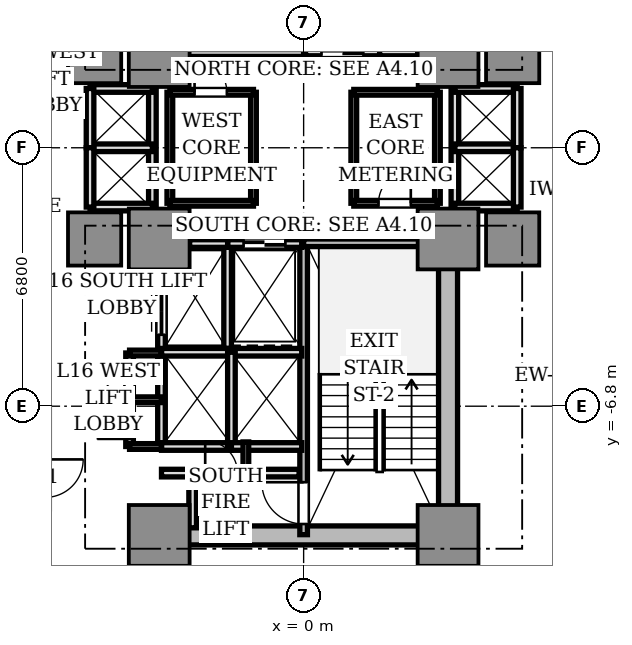
"""IFC4 building model, lengths in metres.
Left out: names, types, materials, properties, quantities, classifications, styles, units other than length and angle.
Written with IfcOpenShell. Run it as: python <this file> out.ifc"""

import sys

from ifc_helpers import new_model, si_unit, direction, frame, frame_2d, origin, origin_2d, place, context, subcontext, project, spatial, rectangle, extrude, source, transform, mapped, element, fill, save


model = new_model("IFC4")
c1 = context("Model", 3, precision=1e-05, world=origin(), true_north=direction((0.0, 1.0)))
c2 = subcontext(c1, "Body", "Model", "MODEL_VIEW")
j1 = project(units=[si_unit("LENGTHUNIT", "METRE"), si_unit("PLANEANGLEUNIT", "RADIAN")], contexts=[c1])
p1 = place(None, origin())
s1 = spatial("IfcSite", under=j1, at=p1, CompositionType="ELEMENT")
p2 = place(p1, origin())
s2 = spatial("IfcBuilding", under=s1, at=p2, CompositionType="ELEMENT")
p3 = place(p2, frame((0.0, 0.0, 61.1)))
s3 = spatial("IfcBuildingStorey", under=s2, at=p3, CompositionType="ELEMENT", Elevation=61.1)
p4 = place(p3, frame((-3.55, -10.2, 0.0), z_axis=(0.0, 0.0, 1.0), x_axis=(1.0, 0.0, 0.0)))
e1 = element("IfcWall", 1, at=p4, inside=s3, PredefinedType="SHEAR", context=c2, shape_type="SweptSolid", body=[
    extrude(rectangle(XDim=7.1, YDim=0.5, at=frame_2d((3.55, 0.0))), origin(), (0.0, 0.0, 1.0), 3.11),
])
p5 = place(p3, frame((3.8, -9.75, 0.0), z_axis=(0.0, 0.0, 1.0), x_axis=(0.0, 1.0, 0.0)))
e2 = element("IfcWall", 2, at=p5, inside=s3, PredefinedType="SHEAR", context=c2, shape_type="SweptSolid", body=[
    extrude(rectangle(XDim=6.9, YDim=0.5, at=frame_2d((3.45, 0.0))), origin(), (0.0, 0.0, 1.0), 3.11),
])
m1 = source(origin(), c2, "Body", "SweptSolid", [
    extrude(rectangle(XDim=1.6, YDim=1.6, at=origin_2d()), origin(), (0.0, 0.0, 1.0), 3.11),
])
for number, where, z_axis, x_axis in (
    (3, (-3.8, 2.4, 0.0), (0.0, 0.0, 1.0), (1.0, 0.0, 0.0)),
    (4, (3.8, 2.4, 0.0), (0.0, 0.0, 1.0), (1.0, 0.0, 0.0)),
    (5, (-3.8, -2.4, 0.0), (0.0, 0.0, 1.0), (1.0, 0.0, 0.0)),
    (6, (3.8, -2.4, 0.0), (0.0, 0.0, 1.0), (1.0, 0.0, 0.0)),
    (7, (-3.8, -10.2, 0.0), (0.0, 0.0, 1.0), (1.0, 0.0, 0.0)),
    (8, (3.8, -10.2, 0.0), (0.0, 0.0, 1.0), (1.0, 0.0, 0.0)),
):
    element("IfcColumn", number, at=place(p3, frame(where, z_axis=z_axis, x_axis=x_axis)), inside=s3, PredefinedType="COLUMN", context=c2, shape_type="MappedRepresentation", body=[
        mapped(m1, transform((0.0, 0.0, 0.0), scale=1.0)),
    ])
m2 = source(origin(), c2, "Body", "SweptSolid", [
    extrude(rectangle(XDim=1.4, YDim=1.4, at=origin_2d()), origin(), (0.0, 0.0, 1.0), 3.11),
])
for number, where, z_axis, x_axis in (
    (9, (5.5, 2.4, 0.0), (0.0, 0.0, 1.0), (1.0, 0.0, 0.0)),
    (10, (-5.5, 2.4, 0.0), (0.0, 0.0, 1.0), (1.0, 0.0, 0.0)),
    (11, (5.5, -2.4, 0.0), (0.0, 0.0, 1.0), (1.0, 0.0, 0.0)),
    (12, (-5.5, -2.4, 0.0), (0.0, 0.0, 1.0), (1.0, 0.0, 0.0)),
):
    element("IfcColumn", number, at=place(p3, frame(where, z_axis=z_axis, x_axis=x_axis)), inside=s3, PredefinedType="COLUMN", context=c2, shape_type="MappedRepresentation", body=[
        mapped(m2, transform((0.0, 0.0, 0.0), scale=1.0)),
    ])
p6 = place(p3, frame((0.0, 2.5, 0.0), z_axis=(0.0, 0.0, 1.0), x_axis=(0.0, 1.0, 0.0)))
e13 = element("IfcWall", 13, at=p6, inside=s3, PredefinedType="SOLIDWALL", context=c2, shape_type="SweptSolid", body=[
    extrude(rectangle(XDim=7.68, YDim=0.2, at=frame_2d((3.84, 0.0))), origin(), (0.0, 0.0, 1.0), 3.11),
])
p7 = place(p6, frame((6.5, 0.0, 0.0)))
e14 = element("IfcOpeningElement", 14, at=p7, cuts=e13, PredefinedType="OPENING", context=c2, shape_type="SweptSolid", body=[
    extrude(rectangle(XDim=0.95, YDim=2.15, at=frame_2d((0.475, 1.075))), frame((0.0, 0.11, 0.0), z_axis=(0.0, -1.0, 0.0), x_axis=(1.0, 0.0, 0.0)), (0.0, 0.0, 1.0), 0.22),
])
p8 = place(p3, frame((-3.72, 2.5, 0.0), z_axis=(0.0, 0.0, 1.0), x_axis=(1.0, 0.0, 0.0)))
e15 = element("IfcWall", 15, at=p8, inside=s3, PredefinedType="SOLIDWALL", context=c2, shape_type="SweptSolid", body=[
    extrude(rectangle(XDim=3.72, YDim=0.2, at=frame_2d((1.86, 0.0))), origin(), (0.0, 0.0, 1.0), 3.11),
])
p9 = place(p3, frame((0.0, -10.18, 0.0), z_axis=(0.0, 0.0, 1.0), x_axis=(0.0, 1.0, 0.0)))
e16 = element("IfcWall", 16, at=p9, inside=s3, PredefinedType="SOLIDWALL", context=c2, shape_type="SweptSolid", body=[
    extrude(rectangle(XDim=7.68, YDim=0.2, at=frame_2d((3.84, 0.0))), origin(), (0.0, 0.0, 1.0), 3.11),
])
p10 = place(p9, frame((0.28, 0.0, 0.0)))
e17 = element("IfcOpeningElement", 17, at=p10, cuts=e16, PredefinedType="OPENING", context=c2, shape_type="SweptSolid", body=[
    extrude(rectangle(XDim=1.1, YDim=2.15, at=frame_2d((0.55, 1.075))), frame((0.0, 0.11, 0.0), z_axis=(0.0, -1.0, 0.0), x_axis=(1.0, 0.0, 0.0)), (0.0, 0.0, 1.0), 0.22),
])
p11 = place(p3, frame((0.0, -2.5, 0.0), z_axis=(0.0, 0.0, 1.0), x_axis=(1.0, 0.0, 0.0)))
e18 = element("IfcWall", 18, at=p11, inside=s3, PredefinedType="SOLIDWALL", context=c2, shape_type="SweptSolid", body=[
    extrude(rectangle(XDim=3.72, YDim=0.2, at=frame_2d((1.86, 0.0))), origin(), (0.0, 0.0, 1.0), 3.11),
])
p12 = place(p3, frame((2.0, 2.5, 0.0), z_axis=(0.0, 0.0, 1.0), x_axis=(0.0, 1.0, 0.0)))
e19 = element("IfcWall", 19, at=p12, inside=s3, PredefinedType="SOLIDWALL", context=c2, shape_type="SweptSolid", body=[
    extrude(rectangle(XDim=2.78, YDim=0.2, at=frame_2d((1.39, 0.0))), origin(), (0.0, 0.0, 1.0), 2.66),
])
p13 = place(p3, frame((0.05, 2.52, 0.0), z_axis=(0.0, 0.0, 1.0), x_axis=(1.0, 0.0, 0.0)))
e20 = element("IfcWall", 20, at=p13, inside=s3, PredefinedType="SOLIDWALL", context=c2, shape_type="SweptSolid", body=[
    extrude(rectangle(XDim=1.95, YDim=0.2, at=frame_2d((0.975, 0.0))), origin(), (0.0, 0.0, 1.0), 2.66),
])
p14 = place(p13, frame((0.42, 0.0, 0.0)))
e21 = element("IfcOpeningElement", 21, at=p14, cuts=e20, PredefinedType="OPENING", context=c2, shape_type="SweptSolid", body=[
    extrude(rectangle(XDim=1.1, YDim=2.2, at=frame_2d((0.55, 1.1))), frame((0.0, 0.11, 0.0), z_axis=(0.0, -1.0, 0.0), x_axis=(1.0, 0.0, 0.0)), (0.0, 0.0, 1.0), 0.22),
])
p15 = place(p3, frame((-2.0, -5.28, 0.0), z_axis=(0.0, 0.0, 1.0), x_axis=(0.0, 1.0, 0.0)))
e22 = element("IfcWall", 22, at=p15, inside=s3, PredefinedType="SOLIDWALL", context=c2, shape_type="SweptSolid", body=[
    extrude(rectangle(XDim=2.78, YDim=0.2, at=frame_2d((1.39, 0.0))), origin(), (0.0, 0.0, 1.0), 2.66),
])
p16 = place(p3, frame((-2.0, -2.52, 0.0), z_axis=(0.0, 0.0, 1.0), x_axis=(1.0, 0.0, 0.0)))
e23 = element("IfcWall", 23, at=p16, inside=s3, PredefinedType="SOLIDWALL", context=c2, shape_type="SweptSolid", body=[
    extrude(rectangle(XDim=1.95, YDim=0.2, at=frame_2d((0.975, 0.0))), origin(), (0.0, 0.0, 1.0), 2.66),
])
p17 = place(p16, frame((0.42, 0.0, 0.0)))
e24 = element("IfcOpeningElement", 24, at=p17, cuts=e23, PredefinedType="OPENING", context=c2, shape_type="SweptSolid", body=[
    extrude(rectangle(XDim=1.1, YDim=2.2, at=frame_2d((0.55, 1.1))), frame((0.0, 0.11, 0.0), z_axis=(0.0, -1.0, 0.0), x_axis=(1.0, 0.0, 0.0)), (0.0, 0.0, 1.0), 0.22),
])
for number, where, z_axis, x_axis in (
    (25, (2.0, 2.52, 0.0), (0.0, 0.0, 1.0), (1.0, 0.0, 0.0)),
    (26, (-3.0, -2.52, 0.0), (0.0, 0.0, 1.0), (1.0, 0.0, 0.0)),
):
    element("IfcWall", number, at=place(p3, frame(where, z_axis=z_axis, x_axis=x_axis)), inside=s3, PredefinedType="SOLIDWALL", context=c2, shape_type="SweptSolid", body=[
        extrude(rectangle(XDim=1.0, YDim=0.2, at=frame_2d((0.5, 0.0))), origin(), (0.0, 0.0, 1.0), 2.66),
    ])
p18 = place(p3, frame((-3.74, -5.36, 0.0), z_axis=(0.0, 0.0, 1.0), x_axis=(0.0, 1.0, 0.0)))
e27 = element("IfcWall", 27, at=p18, inside=s3, PredefinedType="SOLIDWALL", context=c2, shape_type="SweptSolid", body=[
    extrude(rectangle(XDim=2.08, YDim=0.2, at=frame_2d((1.04, 0.0))), origin(), (0.0, 0.0, 1.0), 2.66),
])
p19 = place(p18, frame((0.44, 0.0, 0.0)))
e28 = element("IfcOpeningElement", 28, at=p19, cuts=e27, PredefinedType="OPENING", context=c2, shape_type="SweptSolid", body=[
    extrude(rectangle(XDim=1.2, YDim=2.2, at=frame_2d((0.6, 1.1))), frame((0.0, 0.11, 0.0), z_axis=(0.0, -1.0, 0.0), x_axis=(1.0, 0.0, 0.0)), (0.0, 0.0, 1.0), 0.22),
])
p20 = place(p3, frame((-3.74, -7.86, 0.0), z_axis=(0.0, 0.0, 1.0), x_axis=(0.0, 1.0, 0.0)))
e29 = element("IfcWall", 29, at=p20, inside=s3, PredefinedType="SOLIDWALL", context=c2, shape_type="SweptSolid", body=[
    extrude(rectangle(XDim=2.48, YDim=0.2, at=frame_2d((1.24, 0.0))), origin(), (0.0, 0.0, 1.0), 2.66),
])
p21 = place(p3, frame((-3.74, -7.86, 0.0), z_axis=(0.0, 0.0, 1.0), x_axis=(1.0, 0.0, 0.0)))
e30 = element("IfcWall", 30, at=p21, inside=s3, PredefinedType="SOLIDWALL", context=c2, shape_type="SweptSolid", body=[
    extrude(rectangle(XDim=1.84, YDim=0.2, at=frame_2d((0.92, 0.0))), origin(), (0.0, 0.0, 1.0), 2.66),
])
p22 = place(p3, frame((-3.74, -5.38, 0.0), z_axis=(0.0, 0.0, 1.0), x_axis=(1.0, 0.0, 0.0)))
e31 = element("IfcWall", 31, at=p22, inside=s3, PredefinedType="SOLIDWALL", context=c2, shape_type="SweptSolid", body=[
    extrude(rectangle(XDim=3.69, YDim=0.2, at=frame_2d((1.845, 0.0))), origin(), (0.0, 0.0, 1.0), 2.66),
])
p23 = place(p3, frame((-1.9, -7.86, 0.0), z_axis=(0.0, 0.0, 1.0), x_axis=(0.0, 1.0, 0.0)))
e32 = element("IfcWall", 32, at=p23, inside=s3, PredefinedType="SOLIDWALL", context=c2, shape_type="SweptSolid", body=[
    extrude(rectangle(XDim=2.48, YDim=0.2, at=frame_2d((1.24, 0.0))), origin(), (0.0, 0.0, 1.0), 2.66),
])
p24 = place(p3, frame((-1.9, -7.86, 0.0), z_axis=(0.0, 0.0, 1.0), x_axis=(1.0, 0.0, 0.0)))
e33 = element("IfcWall", 33, at=p24, inside=s3, PredefinedType="SOLIDWALL", context=c2, shape_type="SweptSolid", body=[
    extrude(rectangle(XDim=1.85, YDim=0.2, at=frame_2d((0.925, 0.0))), origin(), (0.0, 0.0, 1.0), 2.66),
])
p25 = place(p3, frame((3.98, -1.56, 0.0), z_axis=(0.0, 0.0, 1.0), x_axis=(0.0, 1.0, 0.0)))
e34 = element("IfcWall", 34, at=p25, inside=s3, PredefinedType="SOLIDWALL", context=c2, shape_type="SweptSolid", body=[
    extrude(rectangle(XDim=3.12, YDim=0.2, at=frame_2d((1.56, 0.0))), origin(), (0.0, 0.0, 1.0), 2.18),
])
for number, where, z_axis, x_axis in (
    (35, (3.98, 1.56, 0.0), (0.0, 0.0, 1.0), (1.0, 0.0, 0.0)),
    (36, (3.98, -1.56, 0.0), (0.0, 0.0, 1.0), (1.0, 0.0, 0.0)),
    (37, (3.98, 0.0, 0.0), (0.0, 0.0, 1.0), (1.0, 0.0, 0.0)),
):
    element("IfcWall", number, at=place(p3, frame(where, z_axis=z_axis, x_axis=x_axis)), inside=s3, PredefinedType="SOLIDWALL", context=c2, shape_type="SweptSolid", body=[
        extrude(rectangle(XDim=1.64, YDim=0.2, at=frame_2d((0.82, 0.0))), origin(), (0.0, 0.0, 1.0), 2.66),
    ])
for number, where, z_axis, x_axis in (
    (38, (5.62, 0.0, 0.0), (0.0, 0.0, 1.0), (0.0, 1.0, 0.0)),
    (39, (5.62, -1.56, 0.0), (0.0, 0.0, 1.0), (0.0, 1.0, 0.0)),
):
    element("IfcWall", number, at=place(p3, frame(where, z_axis=z_axis, x_axis=x_axis)), inside=s3, PredefinedType="SOLIDWALL", context=c2, shape_type="SweptSolid", body=[
        extrude(rectangle(XDim=1.56, YDim=0.2, at=frame_2d((0.78, 0.0))), origin(), (0.0, 0.0, 1.0), 2.66),
    ])
p26 = place(p3, frame((-3.98, -1.56, 0.0), z_axis=(0.0, 0.0, 1.0), x_axis=(0.0, 1.0, 0.0)))
e40 = element("IfcWall", 40, at=p26, inside=s3, PredefinedType="SOLIDWALL", context=c2, shape_type="SweptSolid", body=[
    extrude(rectangle(XDim=3.12, YDim=0.2, at=frame_2d((1.56, 0.0))), origin(), (0.0, 0.0, 1.0), 2.18),
])
for number, where, z_axis, x_axis in (
    (41, (-5.62, 1.56, 0.0), (0.0, 0.0, 1.0), (1.0, 0.0, 0.0)),
    (42, (-5.62, -1.56, 0.0), (0.0, 0.0, 1.0), (1.0, 0.0, 0.0)),
    (43, (-5.62, 0.0, 0.0), (0.0, 0.0, 1.0), (1.0, 0.0, 0.0)),
):
    element("IfcWall", number, at=place(p3, frame(where, z_axis=z_axis, x_axis=x_axis)), inside=s3, PredefinedType="SOLIDWALL", context=c2, shape_type="SweptSolid", body=[
        extrude(rectangle(XDim=1.64, YDim=0.2, at=frame_2d((0.82, 0.0))), origin(), (0.0, 0.0, 1.0), 2.66),
    ])
for number, where, z_axis, x_axis in (
    (44, (-5.62, 0.0, 0.0), (0.0, 0.0, 1.0), (0.0, 1.0, 0.0)),
    (45, (-5.62, -1.56, 0.0), (0.0, 0.0, 1.0), (0.0, 1.0, 0.0)),
):
    element("IfcWall", number, at=place(p3, frame(where, z_axis=z_axis, x_axis=x_axis)), inside=s3, PredefinedType="SOLIDWALL", context=c2, shape_type="SweptSolid", body=[
        extrude(rectangle(XDim=1.56, YDim=0.2, at=frame_2d((0.78, 0.0))), origin(), (0.0, 0.0, 1.0), 2.66),
    ])
p27 = place(p3, frame((-3.74, -8.56, 0.0), z_axis=(0.0, 0.0, 1.0), x_axis=(1.0, 0.0, 0.0)))
e46 = element("IfcWall", 46, at=p27, inside=s3, PredefinedType="SOLIDWALL", context=c2, shape_type="SweptSolid", body=[
    extrude(rectangle(XDim=3.62, YDim=0.2, at=frame_2d((1.81, 0.0))), origin(), (0.0, 0.0, 1.0), 2.66),
])
p28 = place(p27, frame((1.15, 0.0, 0.0)))
e47 = element("IfcOpeningElement", 47, at=p28, cuts=e46, PredefinedType="OPENING", context=c2, shape_type="SweptSolid", body=[
    extrude(rectangle(XDim=0.85, YDim=2.1, at=frame_2d((0.425, 1.05))), frame((0.0, 0.11, 0.0), z_axis=(0.0, -1.0, 0.0), x_axis=(1.0, 0.0, 0.0)), (0.0, 0.0, 1.0), 0.22),
])
p29 = place(p3, frame((-2.92, -10.0, 0.0), z_axis=(0.0, 0.0, 1.0), x_axis=(0.0, 1.0, 0.0)))
e48 = element("IfcWall", 48, at=p29, inside=s3, PredefinedType="SOLIDWALL", context=c2, shape_type="SweptSolid", body=[
    extrude(rectangle(XDim=1.44, YDim=0.2, at=frame_2d((0.72, 0.0))), origin(), (0.0, 0.0, 1.0), 2.66),
])
p30 = place(p3, frame((-1.52, -8.56, 0.0), z_axis=(0.0, 0.0, 1.0), x_axis=(0.0, 1.0, 0.0)))
e49 = element("IfcWall", 49, at=p30, inside=s3, PredefinedType="PARTITIONING", context=c2, shape_type="SweptSolid", body=[
    extrude(rectangle(XDim=0.82, YDim=0.15, at=frame_2d((0.41, 0.0))), origin(), (0.0, 0.0, 1.0), 2.66),
])
p31 = place(p3, frame((-4.58, -7.86, 0.0), z_axis=(0.0, 0.0, 1.0), x_axis=(0.0, 1.0, 0.0)))
e50 = element("IfcWall", 50, at=p31, inside=s3, PredefinedType="SOLIDWALL", context=c2, shape_type="SweptSolid", body=[
    extrude(rectangle(XDim=2.46, YDim=0.2, at=frame_2d((1.23, 0.0))), origin(), (0.0, 0.0, 1.0), 2.66),
])
p32 = place(p31, frame((0.2, 0.0, 0.0)))
e51 = element("IfcOpeningElement", 51, at=p32, cuts=e50, PredefinedType="OPENING", context=c2, shape_type="SweptSolid", body=[
    extrude(rectangle(XDim=0.85, YDim=2.1, at=frame_2d((0.425, 1.05))), frame((0.0, 0.11, 0.0), z_axis=(0.0, -1.0, 0.0), x_axis=(1.0, 0.0, 0.0)), (0.0, 0.0, 1.0), 0.22),
])
p33 = place(p31, frame((1.38, 0.0, 0.0)))
e52 = element("IfcOpeningElement", 52, at=p33, cuts=e50, PredefinedType="OPENING", context=c2, shape_type="SweptSolid", body=[
    extrude(rectangle(XDim=0.85, YDim=2.1, at=frame_2d((0.425, 1.05))), frame((0.0, 0.11, 0.0), z_axis=(0.0, -1.0, 0.0), x_axis=(1.0, 0.0, 0.0)), (0.0, 0.0, 1.0), 0.22),
])
for number, where, z_axis, x_axis in (
    (53, (-4.58, -5.4, 0.0), (0.0, 0.0, 1.0), (1.0, 0.0, 0.0)),
    (54, (-4.58, -7.86, 0.0), (0.0, 0.0, 1.0), (1.0, 0.0, 0.0)),
    (55, (-4.58, -6.63, 0.0), (0.0, 0.0, 1.0), (1.0, 0.0, 0.0)),
):
    element("IfcWall", number, at=place(p3, frame(where, z_axis=z_axis, x_axis=x_axis)), inside=s3, PredefinedType="PARTITIONING", context=c2, shape_type="SweptSolid", body=[
        extrude(rectangle(XDim=0.84, YDim=0.15, at=frame_2d((0.42, 0.0))), origin(), (0.0, 0.0, 1.0), 2.66),
    ])
p34 = place(p3, frame((-1.32, -1.46, 0.0), z_axis=(0.0, 0.0, 1.0), x_axis=(0.0, 1.0, 0.0)))
e56 = element("IfcWall", 56, at=p34, inside=s3, PredefinedType="PARTITIONING", context=c2, shape_type="SweptSolid", body=[
    extrude(rectangle(XDim=2.92, YDim=0.15, at=frame_2d((1.46, 0.0))), origin(), (0.0, 0.0, 1.0), 2.66),
])
p35 = place(p3, frame((-3.52, -1.46, 0.0), z_axis=(0.0, 0.0, 1.0), x_axis=(0.0, 1.0, 0.0)))
e57 = element("IfcWall", 57, at=p35, inside=s3, PredefinedType="PARTITIONING", context=c2, shape_type="SweptSolid", body=[
    extrude(rectangle(XDim=2.92, YDim=0.15, at=frame_2d((1.46, 0.0))), origin(), (0.0, 0.0, 1.0), 2.18),
])
p36 = place(p3, frame((-3.52, 1.46, 0.0), z_axis=(0.0, 0.0, 1.0), x_axis=(1.0, 0.0, 0.0)))
e58 = element("IfcWall", 58, at=p36, inside=s3, PredefinedType="PARTITIONING", context=c2, shape_type="SweptSolid", body=[
    extrude(rectangle(XDim=2.2, YDim=0.15, at=frame_2d((1.1, 0.0))), origin(), (0.0, 0.0, 1.0), 2.66),
])
p37 = place(p36, frame((0.65, 0.0, 0.0)))
e59 = element("IfcOpeningElement", 59, at=p37, cuts=e58, PredefinedType="OPENING", context=c2, shape_type="SweptSolid", body=[
    extrude(rectangle(XDim=0.85, YDim=2.1, at=frame_2d((0.425, 1.05))), frame((0.0, 0.085, 0.0), z_axis=(0.0, -1.0, 0.0), x_axis=(1.0, 0.0, 0.0)), (0.0, 0.0, 1.0), 0.17),
])
p38 = place(p3, frame((-3.52, -1.46, 0.0), z_axis=(0.0, 0.0, 1.0), x_axis=(1.0, 0.0, 0.0)))
e60 = element("IfcWall", 60, at=p38, inside=s3, PredefinedType="PARTITIONING", context=c2, shape_type="SweptSolid", body=[
    extrude(rectangle(XDim=2.2, YDim=0.15, at=frame_2d((1.1, 0.0))), origin(), (0.0, 0.0, 1.0), 2.66),
])
p39 = place(p3, frame((1.32, -1.46, 0.0), z_axis=(0.0, 0.0, 1.0), x_axis=(0.0, 1.0, 0.0)))
e61 = element("IfcWall", 61, at=p39, inside=s3, PredefinedType="PARTITIONING", context=c2, shape_type="SweptSolid", body=[
    extrude(rectangle(XDim=2.92, YDim=0.15, at=frame_2d((1.46, 0.0))), origin(), (0.0, 0.0, 1.0), 2.66),
])
p40 = place(p3, frame((3.52, -1.46, 0.0), z_axis=(0.0, 0.0, 1.0), x_axis=(0.0, 1.0, 0.0)))
e62 = element("IfcWall", 62, at=p40, inside=s3, PredefinedType="PARTITIONING", context=c2, shape_type="SweptSolid", body=[
    extrude(rectangle(XDim=2.92, YDim=0.15, at=frame_2d((1.46, 0.0))), origin(), (0.0, 0.0, 1.0), 2.18),
])
p41 = place(p3, frame((1.32, 1.46, 0.0), z_axis=(0.0, 0.0, 1.0), x_axis=(1.0, 0.0, 0.0)))
e63 = element("IfcWall", 63, at=p41, inside=s3, PredefinedType="PARTITIONING", context=c2, shape_type="SweptSolid", body=[
    extrude(rectangle(XDim=2.2, YDim=0.15, at=frame_2d((1.1, 0.0))), origin(), (0.0, 0.0, 1.0), 2.66),
])
p42 = place(p3, frame((1.32, -1.46, 0.0), z_axis=(0.0, 0.0, 1.0), x_axis=(1.0, 0.0, 0.0)))
e64 = element("IfcWall", 64, at=p42, inside=s3, PredefinedType="PARTITIONING", context=c2, shape_type="SweptSolid", body=[
    extrude(rectangle(XDim=2.2, YDim=0.15, at=frame_2d((1.1, 0.0))), origin(), (0.0, 0.0, 1.0), 2.66),
])
p43 = place(p42, frame((0.65, 0.0, 0.0)))
e65 = element("IfcOpeningElement", 65, at=p43, cuts=e64, PredefinedType="OPENING", context=c2, shape_type="SweptSolid", body=[
    extrude(rectangle(XDim=0.85, YDim=2.1, at=frame_2d((0.425, 1.05))), frame((0.0, 0.085, 0.0), z_axis=(0.0, -1.0, 0.0), x_axis=(1.0, 0.0, 0.0)), (0.0, 0.0, 1.0), 0.17),
])
m3 = source(origin(), c2, "Body", "SweptSolid", [
    extrude(rectangle(XDim=1.1, YDim=0.05, at=origin_2d()), origin(), (0.0, 0.0, 1.0), 2.2),
])
p44 = place(p14, frame((0.55, 0.0, 0.0)))
e66 = element("IfcDoor", 66, at=p44, inside=s3, OperationType="DOUBLE_DOOR_SLIDING", PredefinedType="DOOR", context=c2, shape_type="MappedRepresentation", body=[
    mapped(m3, transform((0.0, 0.0, 0.0), scale=1.0)),
])
fill(e21, e66)
p45 = place(p17, frame((0.55, 0.0, 0.0)))
e67 = element("IfcDoor", 67, at=p45, inside=s3, OperationType="DOUBLE_DOOR_SLIDING", PredefinedType="DOOR", context=c2, shape_type="MappedRepresentation", body=[
    mapped(m3, transform((0.0, 0.0, 0.0), scale=1.0)),
])
fill(e24, e67)
m4 = source(origin(), c2, "Body", "SweptSolid", [
    extrude(rectangle(XDim=1.2, YDim=0.05, at=origin_2d()), origin(), (0.0, 0.0, 1.0), 2.2),
])
p46 = place(p19, frame((0.6, 0.0, 0.0)))
e68 = element("IfcDoor", 68, at=p46, inside=s3, OperationType="DOUBLE_DOOR_SLIDING", PredefinedType="DOOR", context=c2, shape_type="MappedRepresentation", body=[
    mapped(m4, transform((0.0, 0.0, 0.0), scale=1.0)),
])
fill(e28, e68)
m5 = source(origin(), c2, "Body", "SweptSolid", [
    extrude(rectangle(XDim=1.1, YDim=0.05, at=origin_2d()), origin(), (0.0, 0.0, 1.0), 2.15),
])
p47 = place(p10, frame((0.55, 0.0, 0.0)))
e69 = element("IfcDoor", 69, at=p47, inside=s3, OperationType="SINGLE_SWING_RIGHT", PredefinedType="DOOR", context=c2, shape_type="MappedRepresentation", body=[
    mapped(m5, transform((0.0, 0.0, 0.0), scale=1.0)),
])
fill(e17, e69)
m6 = source(origin(), c2, "Body", "SweptSolid", [
    extrude(rectangle(XDim=0.85, YDim=0.05, at=origin_2d()), origin(), (0.0, 0.0, 1.0), 2.1),
])
p48 = place(p28, frame((0.425, 0.0, 0.0)))
e70 = element("IfcDoor", 70, at=p48, inside=s3, OperationType="SINGLE_SWING_LEFT", PredefinedType="DOOR", context=c2, shape_type="MappedRepresentation", body=[
    mapped(m6, transform((0.0, 0.0, 0.0), scale=1.0)),
])
fill(e47, e70)
p49 = place(p32, frame((0.425, 0.0, 0.0)))
e71 = element("IfcDoor", 71, at=p49, inside=s3, OperationType="SINGLE_SWING_LEFT", PredefinedType="DOOR", context=c2, shape_type="MappedRepresentation", body=[
    mapped(m6, transform((0.0, 0.0, 0.0), scale=1.0)),
])
fill(e51, e71)
p50 = place(p33, frame((0.425, 0.0, 0.0)))
e72 = element("IfcDoor", 72, at=p50, inside=s3, OperationType="SINGLE_SWING_RIGHT", PredefinedType="DOOR", context=c2, shape_type="MappedRepresentation", body=[
    mapped(m6, transform((0.0, 0.0, 0.0), scale=1.0)),
])
fill(e52, e72)
p51 = place(p37, frame((0.425, 0.0, 0.0)))
e73 = element("IfcDoor", 73, at=p51, inside=s3, OperationType="SINGLE_SWING_LEFT", PredefinedType="DOOR", context=c2, shape_type="MappedRepresentation", body=[
    mapped(m6, transform((0.0, 0.0, 0.0), scale=1.0)),
])
fill(e59, e73)
p52 = place(p43, frame((0.425, 0.0, 0.0)))
e74 = element("IfcDoor", 74, at=p52, inside=s3, OperationType="SINGLE_SWING_RIGHT", PredefinedType="DOOR", context=c2, shape_type="MappedRepresentation", body=[
    mapped(m6, transform((0.0, 0.0, 0.0), scale=1.0)),
])
fill(e65, e74)
save(model, sys.argv[1])
